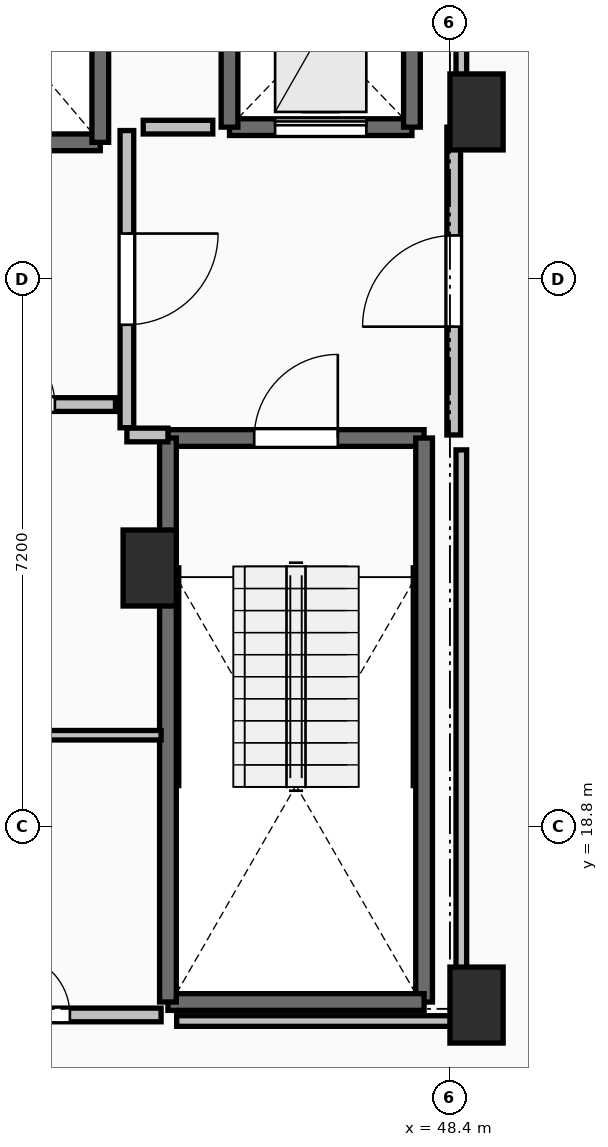
"""IFC4 building model, lengths in metres.
Left out: names, types, materials, properties, quantities, classifications, styles, units other than length and angle.
Written with IfcOpenShell. Run it as: python <this file> out.ifc"""

import sys

from ifc_helpers import new_model, si_unit, direction, frame, frame_2d, origin, origin_2d, place, context, subcontext, project, spatial, rectangle, extrude, element, fill, save


model = new_model("IFC4")
c1 = context("Model", 3, precision=1e-05, world=origin(), true_north=direction((0.0, 1.0)))
c2 = subcontext(c1, "Body", "Model", "MODEL_VIEW")
j1 = project(units=[si_unit("LENGTHUNIT", "METRE"), si_unit("PLANEANGLEUNIT", "RADIAN")], contexts=[c1])
p1 = place(None, origin())
s1 = spatial("IfcSite", under=j1, at=p1, CompositionType="ELEMENT")
p2 = place(p1, origin())
s2 = spatial("IfcBuilding", under=s1, at=p2, CompositionType="ELEMENT")
p3 = place(p2, frame((0.0, 0.0, 210.75)))
s3 = spatial("IfcBuildingStorey", under=s2, at=p3, CompositionType="ELEMENT", Elevation=210.75)
for number, where, z_axis, x_axis in (
    (1, (48.75, 28.2, 0.0), (0.0, 0.0, 1.0), (1.0, 0.0, 0.0)),
    (2, (48.75, 16.45, 0.0), (0.0, 0.0, 1.0), (1.0, 0.0, 0.0)),
    (3, (44.45, 22.2, 0.0), (0.0, 0.0, 1.0), (1.0, 0.0, 0.0)),
):
    element("IfcColumn", number, at=place(p3, frame(where, z_axis=z_axis, x_axis=x_axis)), inside=s3, PredefinedType="PILASTER", context=c2, shape_type="SweptSolid", body=[
        extrude(rectangle(XDim=0.7, YDim=1.0, at=origin_2d()), origin(), (0.0, 0.0, 1.0), 3.55),
    ])
p4 = place(p3, frame((44.69, 23.91, 0.0), z_axis=(0.0, 0.0, 1.0), x_axis=(1.0, 0.0, 0.0)))
e4 = element("IfcWall", 4, at=p4, inside=s3, PredefinedType="SOLIDWALL", context=c2, shape_type="SweptSolid", body=[
    extrude(rectangle(XDim=3.37, YDim=0.22, at=frame_2d((1.685, 0.0))), origin(), (0.0, 0.0, 1.0), 3.29),
])
p5 = place(p4, frame((1.135, 0.0, 0.0)))
e5 = element("IfcOpeningElement", 5, at=p5, cuts=e4, PredefinedType="OPENING", context=c2, shape_type="SweptSolid", body=[
    extrude(rectangle(XDim=1.1, YDim=2.15, at=frame_2d((0.55, 1.075))), frame((0.0, 0.125, 0.0), z_axis=(0.0, -1.0, 0.0), x_axis=(1.0, 0.0, 0.0)), (0.0, 0.0, 1.0), 0.25),
])
p6 = place(p3, frame((48.06, 23.91, 0.0), z_axis=(0.0, 0.0, 1.0), x_axis=(0.0, -1.0, 0.0)))
e6 = element("IfcWall", 6, at=p6, inside=s3, PredefinedType="SOLIDWALL", context=c2, shape_type="SweptSolid", body=[
    extrude(rectangle(XDim=7.42, YDim=0.22, at=frame_2d((3.71, 0.0))), origin(), (0.0, 0.0, 1.0), 3.29),
])
p7 = place(p3, frame((48.06, 16.49, 0.0), z_axis=(0.0, 0.0, 1.0), x_axis=(-1.0, 0.0, 0.0)))
e7 = element("IfcWall", 7, at=p7, inside=s3, PredefinedType="SOLIDWALL", context=c2, shape_type="SweptSolid", body=[
    extrude(rectangle(XDim=3.37, YDim=0.22, at=frame_2d((1.685, 0.0))), origin(), (0.0, 0.0, 1.0), 3.29),
])
p8 = place(p3, frame((44.69, 16.49, 0.0), z_axis=(0.0, 0.0, 1.0), x_axis=(0.0, 1.0, 0.0)))
e8 = element("IfcWall", 8, at=p8, inside=s3, PredefinedType="SOLIDWALL", context=c2, shape_type="SweptSolid", body=[
    extrude(rectangle(XDim=7.42, YDim=0.22, at=frame_2d((3.71, 0.0))), origin(), (0.0, 0.0, 1.0), 3.29),
])
p9 = place(p3, frame((41.6, 27.8, 0.0), z_axis=(0.0, 0.0, 1.0), x_axis=(1.0, 0.0, 0.0)))
e9 = element("IfcWall", 9, at=p9, inside=s3, PredefinedType="SOLIDWALL", context=c2, shape_type="SweptSolid", body=[
    extrude(rectangle(XDim=2.2, YDim=0.22, at=frame_2d((1.1, 0.0))), origin(), (0.0, 0.0, 1.0), 3.29),
])
p10 = place(p3, frame((43.8, 27.8, 0.0), z_axis=(0.0, 0.0, 1.0), x_axis=(0.0, 1.0, 0.0)))
e10 = element("IfcWall", 10, at=p10, inside=s3, PredefinedType="SOLIDWALL", context=c2, shape_type="SweptSolid", body=[
    extrude(rectangle(XDim=2.6, YDim=0.22, at=frame_2d((1.3, 0.0))), origin(), (0.0, 0.0, 1.0), 3.29),
])
p11 = place(p3, frame((45.5, 28.0, 0.0), z_axis=(0.0, 0.0, 1.0), x_axis=(1.0, 0.0, 0.0)))
e11 = element("IfcWall", 11, at=p11, inside=s3, PredefinedType="SHEAR", context=c2, shape_type="SweptSolid", body=[
    extrude(rectangle(XDim=2.4, YDim=0.22, at=frame_2d((1.2, 0.0))), origin(), (0.0, 0.0, 1.0), 3.29),
])
p12 = place(p11, frame((0.6, 0.0, 0.0)))
e12 = element("IfcOpeningElement", 12, at=p12, cuts=e11, PredefinedType="OPENING", context=c2, shape_type="SweptSolid", body=[
    extrude(rectangle(XDim=1.2, YDim=2.2, at=frame_2d((0.6, 1.1))), frame((0.0, 0.125, 0.0), z_axis=(0.0, -1.0, 0.0), x_axis=(1.0, 0.0, 0.0)), (0.0, 0.0, 1.0), 0.25),
])
for number, where, z_axis, x_axis in (
    (13, (47.9, 28.0, 0.0), (0.0, 0.0, 1.0), (0.0, 1.0, 0.0)),
    (14, (45.5, 30.5, 0.0), (0.0, 0.0, 1.0), (0.0, -1.0, 0.0)),
):
    element("IfcWall", number, at=place(p3, frame(where, z_axis=z_axis, x_axis=x_axis)), inside=s3, PredefinedType="SHEAR", context=c2, shape_type="SweptSolid", body=[
        extrude(rectangle(XDim=2.5, YDim=0.22, at=frame_2d((1.25, 0.0))), origin(), (0.0, 0.0, 1.0), 3.29),
    ])
p13 = place(p3, frame((44.15, 27.955, 0.0), z_axis=(0.0, 0.0, 1.0), x_axis=(0.0, -1.0, 0.0)))
e15 = element("IfcWall", 15, at=p13, inside=s3, PredefinedType="PARTITIONING", context=c2, shape_type="SweptSolid", body=[
    extrude(rectangle(XDim=3.91, YDim=0.18, at=frame_2d((1.955, 0.0))), origin(), (0.0, 0.0, 1.0), 3.29),
])
p14 = place(p13, frame((1.355, 0.0, 0.0)))
e16 = element("IfcOpeningElement", 16, at=p14, cuts=e15, PredefinedType="OPENING", context=c2, shape_type="SweptSolid", body=[
    extrude(rectangle(XDim=1.2, YDim=2.15, at=frame_2d((0.6, 1.075))), frame((0.0, 0.105, 0.0), z_axis=(0.0, -1.0, 0.0), x_axis=(1.0, 0.0, 0.0)), (0.0, 0.0, 1.0), 0.21),
])
p15 = place(p3, frame((44.15, 23.95, 0.0), z_axis=(0.0, 0.0, 1.0), x_axis=(1.0, 0.0, 0.0)))
e17 = element("IfcWall", 17, at=p15, inside=s3, PredefinedType="PARTITIONING", context=c2, shape_type="SweptSolid", body=[
    extrude(rectangle(XDim=0.54, YDim=0.18, at=frame_2d((0.27, 0.0))), origin(), (0.0, 0.0, 1.0), 3.29),
])
p16 = place(p3, frame((48.45, 23.95, 0.0), z_axis=(0.0, 0.0, 1.0), x_axis=(0.0, 1.0, 0.0)))
e18 = element("IfcWall", 18, at=p16, inside=s3, PredefinedType="PARTITIONING", context=c2, shape_type="SweptSolid", body=[
    extrude(rectangle(XDim=4.05, YDim=0.18, at=frame_2d((2.025, 0.0))), origin(), (0.0, 0.0, 1.0), 3.29),
])
p17 = place(p16, frame((1.425, 0.0, 0.0)))
e19 = element("IfcOpeningElement", 19, at=p17, cuts=e18, PredefinedType="OPENING", context=c2, shape_type="SweptSolid", body=[
    extrude(rectangle(XDim=1.2, YDim=2.15, at=frame_2d((0.6, 1.075))), frame((0.0, 0.105, 0.0), z_axis=(0.0, -1.0, 0.0), x_axis=(1.0, 0.0, 0.0)), (0.0, 0.0, 1.0), 0.21),
])
p18 = place(p3, frame((41.555, 24.35, 0.0), z_axis=(0.0, 0.0, 1.0), x_axis=(1.0, 0.0, 0.0)))
e20 = element("IfcWall", 20, at=p18, inside=s3, PredefinedType="PARTITIONING", context=c2, shape_type="SweptSolid", body=[
    extrude(rectangle(XDim=2.445, YDim=0.18, at=frame_2d((1.223, 0.0))), origin(), (0.0, 0.0, 1.0), 3.29),
])
p19 = place(p18, frame((0.798, 0.0, 0.0)))
e21 = element("IfcOpeningElement", 21, at=p19, cuts=e20, PredefinedType="OPENING", context=c2, shape_type="SweptSolid", body=[
    extrude(rectangle(XDim=0.85, YDim=2.1, at=frame_2d((0.425, 1.05))), frame((0.0, 0.105, 0.0), z_axis=(0.0, -1.0, 0.0), x_axis=(1.0, 0.0, 0.0)), (0.0, 0.0, 1.0), 0.21),
])
p20 = place(p3, frame((44.6, 20.0, 0.0), z_axis=(0.0, 0.0, 1.0), x_axis=(-1.0, 0.0, 0.0)))
e22 = element("IfcWall", 22, at=p20, inside=s3, PredefinedType="PARTITIONING", context=c2, shape_type="SweptSolid", body=[
    extrude(rectangle(XDim=3.2, YDim=0.125, at=frame_2d((1.6, 0.0))), origin(), (0.0, 0.0, 1.0), 3.29),
])
p21 = place(p3, frame((41.4, 16.32, 0.0), z_axis=(0.0, 0.0, 1.0), x_axis=(1.0, 0.0, 0.0)))
e23 = element("IfcWall", 23, at=p21, inside=s3, PredefinedType="PARTITIONING", context=c2, shape_type="SweptSolid", body=[
    extrude(rectangle(XDim=3.2, YDim=0.18, at=frame_2d((1.6, 0.0))), origin(), (0.0, 0.0, 1.0), 3.29),
])
p22 = place(p21, frame((1.2, 0.0, 0.0)))
e24 = element("IfcOpeningElement", 24, at=p22, cuts=e23, PredefinedType="OPENING", context=c2, shape_type="SweptSolid", body=[
    extrude(rectangle(XDim=0.8, YDim=2.05, at=frame_2d((0.4, 1.025))), frame((0.0, 0.105, 0.0), z_axis=(0.0, -1.0, 0.0), x_axis=(1.0, 0.0, 0.0)), (0.0, 0.0, 1.0), 0.21),
])
p23 = place(p3, frame((45.28, 28.0, 0.0), z_axis=(0.0, 0.0, 1.0), x_axis=(-1.0, 0.0, 0.0)))
e25 = element("IfcWall", 25, at=p23, inside=s3, PredefinedType="PARTITIONING", context=c2, shape_type="SweptSolid", body=[
    extrude(rectangle(XDim=0.915, YDim=0.18, at=frame_2d((0.458, 0.0))), origin(), (0.0, 0.0, 1.0), 3.29),
])
p24 = place(p3, frame((44.805, 16.24, 0.0), z_axis=(0.0, 0.0, 1.0), x_axis=(1.0, 0.0, 0.0)))
e26 = element("IfcWall", 26, at=p24, inside=s3, PredefinedType="PARTITIONING", context=c2, shape_type="SweptSolid", body=[
    extrude(rectangle(XDim=3.745, YDim=0.14, at=frame_2d((1.873, 0.0))), origin(), (0.0, 0.0, 1.0), 2.482),
])
p25 = place(p3, frame((48.55, 16.24, 0.0), z_axis=(0.0, 0.0, 1.0), x_axis=(0.0, 1.0, 0.0)))
e27 = element("IfcWall", 27, at=p25, inside=s3, PredefinedType="PARTITIONING", context=c2, shape_type="SweptSolid", body=[
    extrude(rectangle(XDim=7.514, YDim=0.14, at=frame_2d((3.757, 0.0))), origin(), (0.0, 0.0, 1.0), 2.482),
])
p26 = place(p3, frame((48.55, 28.196, 0.0), z_axis=(0.0, 0.0, 1.0), x_axis=(0.0, 1.0, 0.0)))
e28 = element("IfcWall", 28, at=p26, inside=s3, PredefinedType="PARTITIONING", context=c2, shape_type="SweptSolid", body=[
    extrude(rectangle(XDim=5.254, YDim=0.14, at=frame_2d((2.627, 0.0))), origin(), (0.0, 0.0, 1.0), 2.482),
])
p27 = place(p5, origin())
e29 = element("IfcDoor", 29, at=p27, inside=s3, OperationType="SINGLE_SWING_RIGHT", PredefinedType="DOOR", context=c2, shape_type="SweptSolid", body=[
    extrude(rectangle(XDim=1.1, YDim=2.15, at=frame_2d((0.55, 1.075))), frame((0.0, 0.025, 0.0), z_axis=(0.0, -1.0, 0.0), x_axis=(1.0, 0.0, 0.0)), (0.0, 0.0, 1.0), 0.05),
])
fill(e5, e29)
p28 = place(p12, origin())
e30 = element("IfcDoor", 30, at=p28, inside=s3, OperationType="SLIDING_TO_LEFT", PredefinedType="DOOR", context=c2, shape_type="SweptSolid", body=[
    extrude(rectangle(XDim=1.2, YDim=2.2, at=frame_2d((0.6, 1.1))), frame((0.0, 0.025, 0.0), z_axis=(0.0, -1.0, 0.0), x_axis=(1.0, 0.0, 0.0)), (0.0, 0.0, 1.0), 0.05),
])
fill(e12, e30)
p29 = place(p14, origin())
e31 = element("IfcDoor", 31, at=p29, inside=s3, OperationType="SINGLE_SWING_LEFT", PredefinedType="DOOR", context=c2, shape_type="SweptSolid", body=[
    extrude(rectangle(XDim=1.2, YDim=2.15, at=frame_2d((0.6, 1.075))), frame((0.0, 0.025, 0.0), z_axis=(0.0, -1.0, 0.0), x_axis=(1.0, 0.0, 0.0)), (0.0, 0.0, 1.0), 0.05),
])
fill(e16, e31)
p30 = place(p17, origin())
e32 = element("IfcDoor", 32, at=p30, inside=s3, OperationType="SINGLE_SWING_LEFT", PredefinedType="DOOR", context=c2, shape_type="SweptSolid", body=[
    extrude(rectangle(XDim=1.2, YDim=2.15, at=frame_2d((0.6, 1.075))), frame((0.0, 0.025, 0.0), z_axis=(0.0, -1.0, 0.0), x_axis=(1.0, 0.0, 0.0)), (0.0, 0.0, 1.0), 0.05),
])
fill(e19, e32)
p31 = place(p19, origin())
e33 = element("IfcDoor", 33, at=p31, inside=s3, OperationType="SINGLE_SWING_LEFT", PredefinedType="DOOR", context=c2, shape_type="SweptSolid", body=[
    extrude(rectangle(XDim=0.85, YDim=2.1, at=frame_2d((0.425, 1.05))), frame((0.0, 0.025, 0.0), z_axis=(0.0, -1.0, 0.0), x_axis=(1.0, 0.0, 0.0)), (0.0, 0.0, 1.0), 0.05),
])
fill(e21, e33)
p32 = place(p22, origin())
e34 = element("IfcDoor", 34, at=p32, inside=s3, OperationType="SINGLE_SWING_LEFT", PredefinedType="DOOR", context=c2, shape_type="SweptSolid", body=[
    extrude(rectangle(XDim=0.8, YDim=2.05, at=frame_2d((0.4, 1.025))), frame((0.0, 0.025, 0.0), z_axis=(0.0, -1.0, 0.0), x_axis=(1.0, 0.0, 0.0)), (0.0, 0.0, 1.0), 0.05),
])
fill(e24, e34)
save(model, sys.argv[1])
